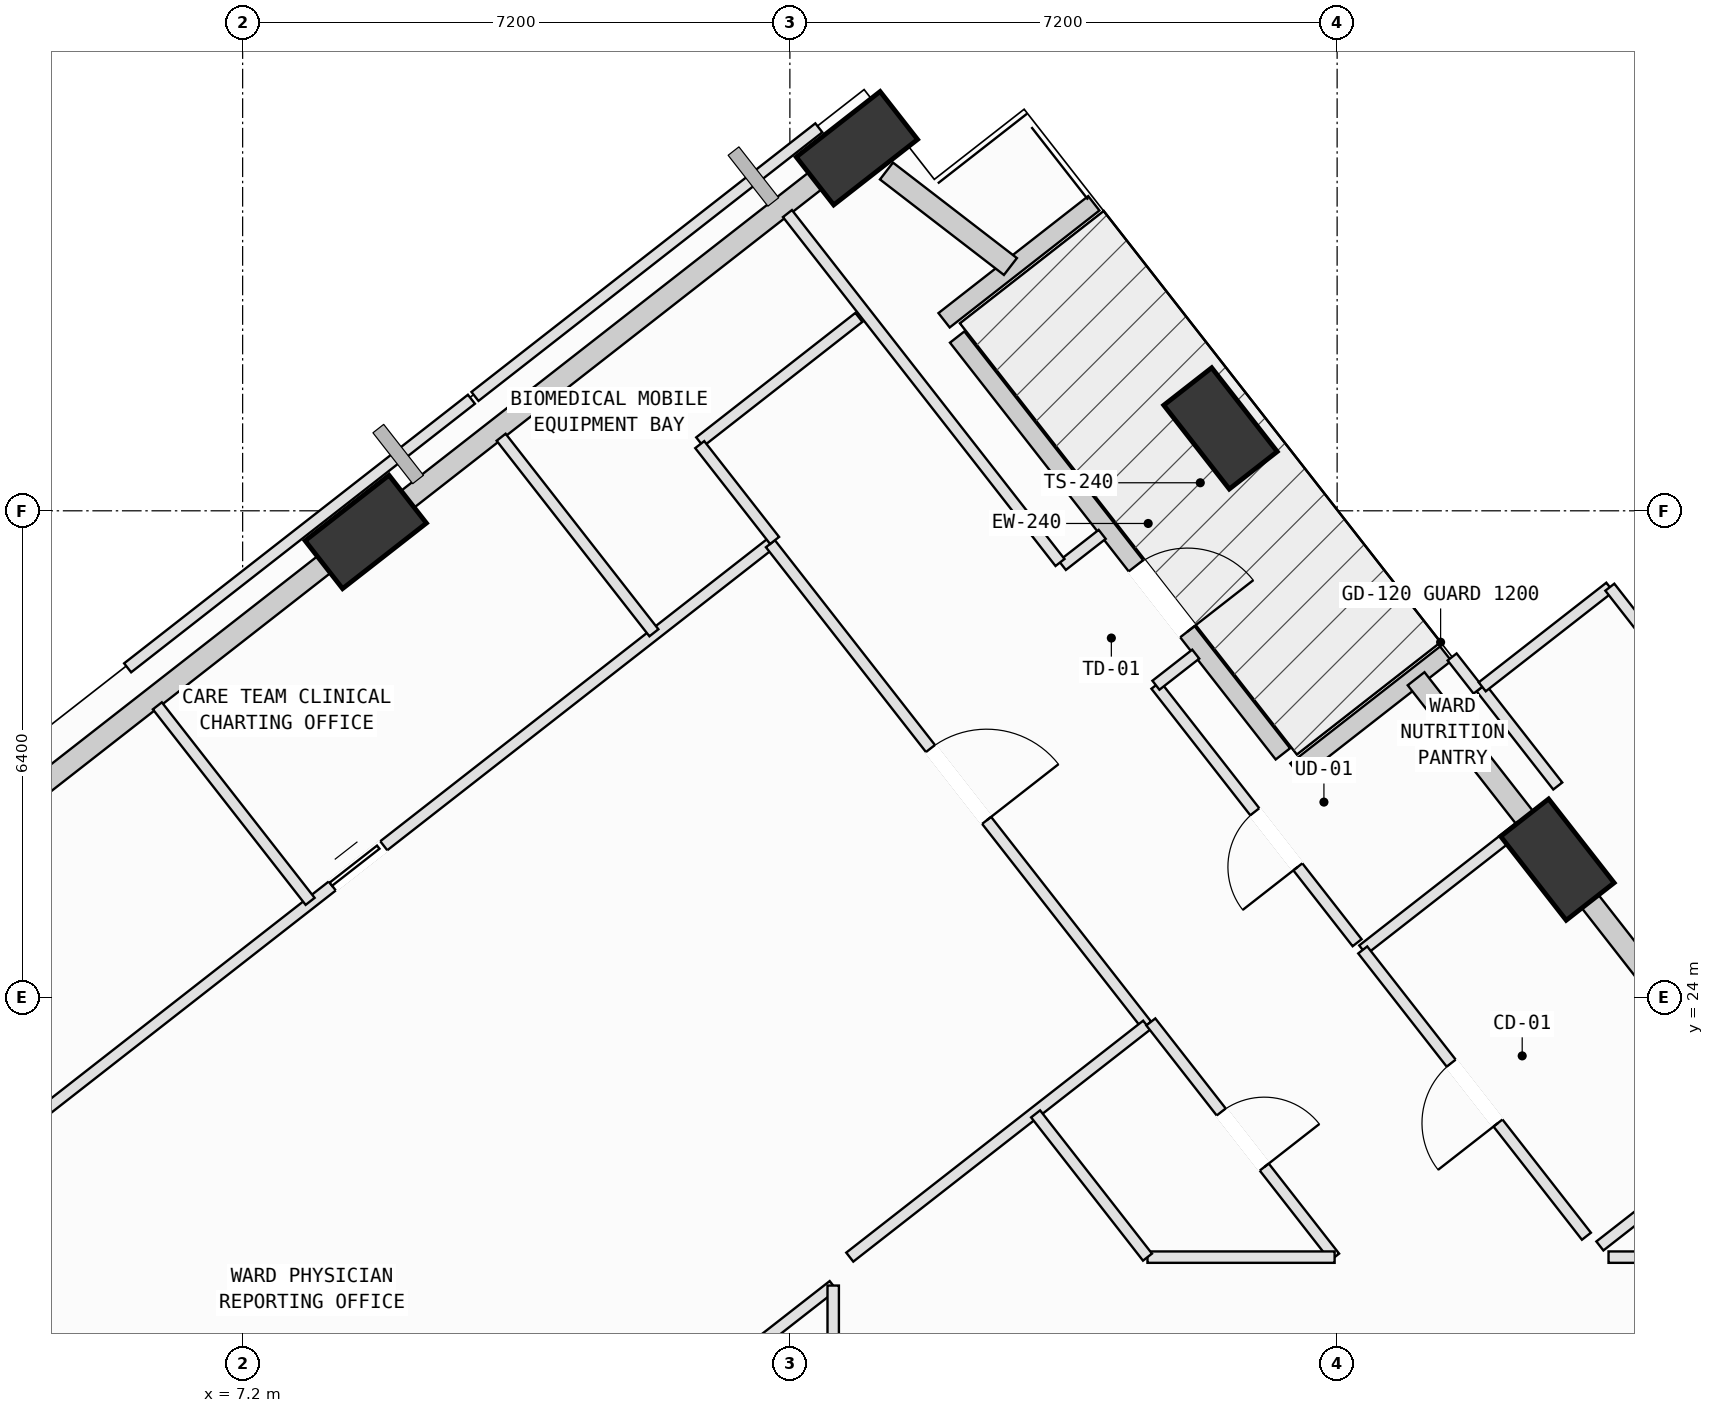
"""IFC4 building model, lengths in metres.
Left out: names, types, materials, properties, quantities, classifications, styles, units other than length and angle.
Written with IfcOpenShell. Run it as: python <this file> out.ifc"""

import sys

from ifc_helpers import new_model, si_unit, direction, frame, frame_2d, origin, origin_2d, place, context, subcontext, project, spatial, rectangle, extrude, element, fill, save


model = new_model("IFC4")
c1 = context("Model", 3, precision=1e-05, world=origin(), true_north=direction((0.0, 1.0)))
c2 = subcontext(c1, "Body", "Model", "MODEL_VIEW")
j1 = project(units=[si_unit("LENGTHUNIT", "METRE"), si_unit("PLANEANGLEUNIT", "RADIAN")], contexts=[c1])
p1 = place(None, origin())
s1 = spatial("IfcSite", under=j1, at=p1, CompositionType="ELEMENT")
p2 = place(p1, origin())
s2 = spatial("IfcBuilding", under=s1, at=p2, CompositionType="ELEMENT")
p3 = place(p2, frame((0.0, 0.0, 185.8)))
s3 = spatial("IfcBuildingStorey", under=s2, at=p3, CompositionType="ELEMENT", Elevation=185.8)
p4 = place(p3, frame((24.498, 25.811, 0.002), z_axis=(-0.003845969984, -0.037727134127, 0.99928067722), x_axis=(-0.532627653931, 0.845821943945, 0.029883463813)))
e1 = element("IfcColumn", 1, at=p4, inside=s3, PredefinedType="COLUMN", context=c2, shape_type="SweptSolid", body=[
    extrude(rectangle(XDim=1.4, YDim=0.8, at=origin_2d()), origin(), (0.0, 0.0, 1.0), 3.999),
])
p5 = place(p3, frame((20.065, 31.484, 0.002), z_axis=(-0.027193352358, -0.05627682562, 0.998044808857), x_axis=(-0.212163059009, 0.975992323481, 0.049252623267)))
e2 = element("IfcColumn", 2, at=p5, inside=s3, PredefinedType="COLUMN", context=c2, shape_type="SweptSolid", body=[
    extrude(rectangle(XDim=1.4, YDim=0.8, at=origin_2d()), origin(), (0.0, 0.0, 1.0), 4.004),
])
p6 = place(p3, frame((15.282, 35.171, 0.002), z_axis=(-0.0421758545, -0.07601391381, 0.996214375626), x_axis=(0.986621482124, 0.153992480505, 0.053519781005)))
e3 = element("IfcColumn", 3, at=p6, inside=s3, PredefinedType="COLUMN", context=c2, shape_type="SweptSolid", body=[
    extrude(rectangle(XDim=1.4, YDim=0.8, at=origin_2d()), origin(), (0.0, 0.0, 1.0), 4.011),
])
p7 = place(p3, frame((8.82, 30.122, 0.002), z_axis=(-0.021082622419, -0.102314513413, 0.994528663929), x_axis=(0.895367194922, 0.440659996949, 0.064314487843)))
e4 = element("IfcColumn", 4, at=p7, inside=s3, PredefinedType="COLUMN", context=c2, shape_type="SweptSolid", body=[
    extrude(rectangle(XDim=1.4, YDim=0.8, at=origin_2d()), origin(), (0.0, 0.0, 1.0), 4.018),
])
p8 = place(p3, frame((16.601, 32.686, 0.0), z_axis=(0.0, 0.0, 1.0), x_axis=(0.615648806913, -0.788020651091, 0.0)))
e5 = element("IfcWall", 5, at=p8, inside=s3, PredefinedType="SOLIDWALL", context=c2, shape_type="SweptSolid", body=[
    extrude(rectangle(XDim=6.96, YDim=0.24, at=frame_2d((3.48, 0.0))), origin(), (0.0, 0.0, 1.0), 3.265),
])
p9 = place(p8, frame((3.82, 0.0, 0.0)))
e6 = element("IfcOpeningElement", 6, at=p9, cuts=e5, PredefinedType="OPENING", context=c2, shape_type="SweptSolid", body=[
    extrude(rectangle(XDim=1.1, YDim=2.15, at=frame_2d((0.55, 1.075))), frame((0.0, 0.13, 0.0), z_axis=(0.0, -1.0, 0.0), x_axis=(1.0, 0.0, 0.0)), (0.0, 0.0, 1.0), 0.26),
])
for number, where, z_axis, x_axis in (
    (7, (21.059, 26.981, 0.0), (0.0, 0.0, 1.0), (0.788, 0.616, 0.0)),
    (8, (18.399, 34.446, 0.0), (0.0, 0.0, 1.0), (-0.788, -0.616, 0.0)),
):
    element("IfcWall", number, at=place(p3, frame(where, z_axis=z_axis, x_axis=x_axis)), inside=s3, PredefinedType="SOLIDWALL", context=c2, shape_type="SweptSolid", body=[
        extrude(rectangle(XDim=2.5, YDim=0.24, at=frame_2d((1.25, 0.0))), origin(), (0.0, 0.0, 1.0), 3.265),
    ])
p10 = place(p3, frame((28.998, 20.052, 0.0), z_axis=(0.0, 0.0, 1.0), x_axis=(-0.615664366432, 0.788008494819, 0.0)))
e9 = element("IfcWall", 9, at=p10, inside=s3, PredefinedType="SOLIDWALL", context=c2, shape_type="SweptSolid", body=[
    extrude(rectangle(XDim=6.76, YDim=0.28, at=frame_2d((3.38, 0.0))), origin(), (0.0, 0.0, 1.0), 3.265),
])
p11 = place(p3, frame((24.228, 26.156, 0.0), z_axis=(0.0, 0.0, 1.0), x_axis=(-0.615726632645, 0.787959842791, 0.0)))
e10 = element("IfcWall", 10, at=p11, inside=s3, PredefinedType="SOLIDWALL", context=c2, shape_type="SweptSolid", body=[
    extrude(rectangle(XDim=2.581, YDim=0.28, at=frame_2d((1.291, 0.0))), origin(), (0.0, 0.0, 1.0), 3.245),
])
p12 = place(p3, frame((15.671, 34.871, 0.0), z_axis=(0.0, 0.0, 1.0), x_axis=(0.792134413679, -0.610346680719, 0.0)))
e11 = element("IfcWall", 11, at=p12, inside=s3, PredefinedType="SOLIDWALL", context=c2, shape_type="SweptSolid", body=[
    extrude(rectangle(XDim=2.059, YDim=0.28, at=frame_2d((1.029, 0.0))), origin(), (0.0, 0.0, 1.0), 3.245),
])
p13 = place(p3, frame((9.07, 30.317, 0.0), z_axis=(0.0, 0.0, 1.0), x_axis=(0.787988540175, 0.615689906165, 0.0)))
e12 = element("IfcWall", 12, at=p13, inside=s3, PredefinedType="SOLIDWALL", context=c2, shape_type="SweptSolid", body=[
    extrude(rectangle(XDim=7.231, YDim=0.28, at=frame_2d((3.615, 0.0))), origin(), (0.0, 0.0, 1.0), 3.265),
])
p14 = place(p3, frame((2.589, 25.254, 0.0), z_axis=(0.0, 0.0, 1.0), x_axis=(0.788021319008, 0.615647951989, 0.0)))
e13 = element("IfcWall", 13, at=p14, inside=s3, PredefinedType="SOLIDWALL", context=c2, shape_type="SweptSolid", body=[
    extrude(rectangle(XDim=7.27, YDim=0.28, at=frame_2d((3.635, 0.0))), origin(), (0.0, 0.0, 1.0), 3.265),
])
p15 = place(p3, frame((7.227, 14.157, 0.0), z_axis=(0.0, 0.0, 1.0), x_axis=(0.788028517416, 0.615638738011, 0.0)))
e14 = element("IfcWall", 14, at=p15, inside=s3, PredefinedType="PARTITIONING", context=c2, shape_type="SweptSolid", body=[
    extrude(rectangle(XDim=9.826, YDim=0.15, at=frame_2d((4.913, 0.0))), origin(), (0.0, 0.0, 1.0), 3.78),
])
p16 = place(p3, frame((14.97, 20.206, 0.0), z_axis=(0.0, 0.0, 1.0), x_axis=(0.0, -1.0, 0.0)))
e15 = element("IfcWall", 15, at=p16, inside=s3, PredefinedType="PARTITIONING", context=c2, shape_type="SweptSolid", body=[
    extrude(rectangle(XDim=1.976, YDim=0.15, at=frame_2d((0.988, 0.0))), origin(), (0.0, 0.0, 1.0), 3.78),
])
p17 = place(p16, frame((0.775, 0.0, 0.0)))
e16 = element("IfcOpeningElement", 16, at=p17, cuts=e15, PredefinedType="OPENING", context=c2, shape_type="SweptSolid", body=[
    extrude(rectangle(XDim=0.86, YDim=2.06, at=frame_2d((0.43, 1.03))), frame((0.0, 0.085, 0.0), z_axis=(0.0, -1.0, 0.0), x_axis=(1.0, 0.0, 0.0)), (0.0, 0.0, 1.0), 0.17),
])
p18 = place(p3, frame((2.671, 21.004, 0.0), z_axis=(0.0, 0.0, 1.0), x_axis=(0.788033017359, 0.615632977961, 0.0)))
e17 = element("IfcWall", 17, at=p18, inside=s3, PredefinedType="PARTITIONING", context=c2, shape_type="SweptSolid", body=[
    extrude(rectangle(XDim=14.559, YDim=0.15, at=frame_2d((7.28, 0.0))), origin(), (0.0, 0.0, 1.0), 3.78),
])
p19 = place(p18, frame((7.244, 0.0, 0.0)))
e18 = element("IfcOpeningElement", 18, at=p19, cuts=e17, PredefinedType="OPENING", context=c2, shape_type="SweptSolid", body=[
    extrude(rectangle(XDim=0.86, YDim=2.06, at=frame_2d((0.43, 1.03))), frame((0.0, 0.085, 0.0), z_axis=(0.0, -1.0, 0.0), x_axis=(1.0, 0.0, 0.0)), (0.0, 0.0, 1.0), 0.17),
])
p20 = place(p3, frame((14.144, 29.967, 0.0), z_axis=(0.0, 0.0, 1.0), x_axis=(0.615702970694, -0.787978332112, 0.0)))
e19 = element("IfcWall", 19, at=p20, inside=s3, PredefinedType="PARTITIONING", context=c2, shape_type="SweptSolid", body=[
    extrude(rectangle(XDim=8.04, YDim=0.15, at=frame_2d((4.02, 0.0))), origin(), (0.0, 0.0, 1.0), 3.78),
])
p21 = place(p20, frame((3.42, 0.0, 0.0)))
e20 = element("IfcOpeningElement", 20, at=p21, cuts=e19, PredefinedType="OPENING", context=c2, shape_type="SweptSolid", body=[
    extrude(rectangle(XDim=1.2, YDim=2.15, at=frame_2d((0.6, 1.075))), frame((0.0, 0.085, 0.0), z_axis=(0.0, -1.0, 0.0), x_axis=(1.0, 0.0, 0.0)), (0.0, 0.0, 1.0), 0.17),
])
p22 = place(p3, frame((19.094, 23.632, 0.0), z_axis=(0.0, 0.0, 1.0), x_axis=(-0.787981810279, -0.615698519301, 0.0)))
e21 = element("IfcWall", 21, at=p22, inside=s3, PredefinedType="PARTITIONING", context=c2, shape_type="SweptSolid", body=[
    extrude(rectangle(XDim=4.957, YDim=0.15, at=frame_2d((2.479, 0.0))), origin(), (0.0, 0.0, 1.0), 3.78),
])
p23 = place(p3, frame((28.44, 20.578, 0.0), z_axis=(0.0, 0.0, 1.0), x_axis=(-0.999999774112, 0.000672143239, 0.0)))
e22 = element("IfcWall", 22, at=p23, inside=s3, PredefinedType="PARTITIONING", context=c2, shape_type="SweptSolid", body=[
    extrude(rectangle(XDim=3.269, YDim=0.15, at=frame_2d((1.635, 0.0))), origin(), (0.0, 0.0, 1.0), 3.78),
])
p24 = place(p3, frame((25.057, 20.727, 0.0), z_axis=(0.0, 0.0, 1.0), x_axis=(0.788068936461, 0.615586997414, 0.0)))
e23 = element("IfcWall", 23, at=p24, inside=s3, PredefinedType="PARTITIONING", context=c2, shape_type="SweptSolid", body=[
    extrude(rectangle(XDim=2.575, YDim=0.15, at=frame_2d((1.287, 0.0))), origin(), (0.0, 0.0, 1.0), 3.78),
])
p25 = place(p3, frame((21.937, 24.622, 0.0), z_axis=(0.0, 0.0, 1.0), x_axis=(0.788163411112, 0.615466032681, 0.0)))
e24 = element("IfcWall", 24, at=p25, inside=s3, PredefinedType="PARTITIONING", context=c2, shape_type="SweptSolid", body=[
    extrude(rectangle(XDim=2.635, YDim=0.15, at=frame_2d((1.317, 0.0))), origin(), (0.0, 0.0, 1.0), 3.78),
])
p26 = place(p3, frame((24.88, 20.855, 0.0), z_axis=(0.0, 0.0, 1.0), x_axis=(-0.61562223779, 0.788041407756, 0.0)))
e25 = element("IfcWall", 25, at=p26, inside=s3, PredefinedType="PARTITIONING", context=c2, shape_type="SweptSolid", body=[
    extrude(rectangle(XDim=4.78, YDim=0.15, at=frame_2d((2.39, 0.0))), origin(), (0.0, 0.0, 1.0), 3.415),
])
p27 = place(p26, frame((1.89, 0.0, 0.0)))
e26 = element("IfcOpeningElement", 26, at=p27, cuts=e25, PredefinedType="OPENING", context=c2, shape_type="SweptSolid", body=[
    extrude(rectangle(XDim=1.0, YDim=2.12, at=frame_2d((0.5, 1.06))), frame((0.0, 0.085, 0.0), z_axis=(0.0, -1.0, 0.0), x_axis=(1.0, 0.0, 0.0)), (0.0, 0.0, 1.0), 0.17),
])
p28 = place(p3, frame((23.494, 28.071, 0.0), z_axis=(0.0, 0.0, 1.0), x_axis=(0.615516872189, -0.788123708596, 0.0)))
e27 = element("IfcWall", 27, at=p28, inside=s3, PredefinedType="PARTITIONING", context=c2, shape_type="SweptSolid", body=[
    extrude(rectangle(XDim=1.639, YDim=0.15, at=frame_2d((0.82, 0.0))), origin(), (0.0, 0.0, 1.0), 3.78),
])
p29 = place(p3, frame((21.863, 24.717, 0.0), z_axis=(0.0, 0.0, 1.0), x_axis=(-0.615664978925, 0.788008016283, 0.0)))
e28 = element("IfcWall", 28, at=p29, inside=s3, PredefinedType="PARTITIONING", context=c2, shape_type="SweptSolid", body=[
    extrude(rectangle(XDim=4.299, YDim=0.15, at=frame_2d((2.15, 0.0))), origin(), (0.0, 0.0, 1.0), 3.78),
])
p30 = place(p29, frame((1.267, 0.0, 0.0)))
e29 = element("IfcOpeningElement", 29, at=p30, cuts=e28, PredefinedType="OPENING", context=c2, shape_type="SweptSolid", body=[
    extrude(rectangle(XDim=0.92, YDim=2.1, at=frame_2d((0.46, 1.05))), frame((0.0, 0.085, 0.0), z_axis=(0.0, -1.0, 0.0), x_axis=(1.0, 0.0, 0.0)), (0.0, 0.0, 1.0), 0.17),
])
p31 = place(p3, frame((19.216, 28.105, 0.0), z_axis=(0.0, 0.0, 1.0), x_axis=(0.78830274662, 0.615287558522, 0.0)))
e30 = element("IfcWall", 30, at=p31, inside=s3, PredefinedType="PARTITIONING", context=c2, shape_type="SweptSolid", body=[
    extrude(rectangle(XDim=0.665, YDim=0.15, at=frame_2d((0.332, 0.0))), origin(), (0.0, 0.0, 1.0), 3.78),
])
p32 = place(p3, frame((23.113, 28.477, 0.0), z_axis=(0.0, 0.0, 1.0), x_axis=(0.616106085267, -0.78766318417, 0.0)))
e31 = element("IfcWall", 31, at=p32, inside=s3, PredefinedType="PARTITIONING", context=c2, shape_type="SweptSolid", body=[
    extrude(rectangle(XDim=0.553, YDim=0.15, at=frame_2d((0.277, 0.0))), origin(), (0.0, 0.0, 1.0), 3.78),
])
p33 = place(p3, frame((18.509, 30.09, 0.0), z_axis=(0.0, 0.0, 1.0), x_axis=(-0.788124583887, -0.615515751442, 0.0)))
e32 = element("IfcWall", 32, at=p33, inside=s3, PredefinedType="PARTITIONING", context=c2, shape_type="SweptSolid", body=[
    extrude(rectangle(XDim=0.665, YDim=0.15, at=frame_2d((0.333, 0.0))), origin(), (0.0, 0.0, 1.0), 3.78),
])
p34 = place(p3, frame((17.954, 29.72, 0.0), z_axis=(0.0, 0.0, 1.0), x_axis=(-0.615581419992, 0.78807329314, 0.0)))
e33 = element("IfcWall", 33, at=p34, inside=s3, PredefinedType="PARTITIONING", context=c2, shape_type="SweptSolid", body=[
    extrude(rectangle(XDim=5.826, YDim=0.15, at=frame_2d((2.913, 0.0))), origin(), (0.0, 0.0, 1.0), 3.78),
])
p35 = place(p3, frame((14.651, 34.919, 0.0), z_axis=(0.0, 0.0, 1.0), x_axis=(0.787972015739, 0.61571105432, 0.0)))
e34 = element("IfcWall", 34, at=p35, inside=s3, PredefinedType="PARTITIONING", context=c2, shape_type="SweptSolid", body=[
    extrude(rectangle(XDim=1.202, YDim=0.15, at=frame_2d((0.601, 0.0))), origin(), (0.0, 0.0, 1.0), 3.265),
])
p36 = place(p3, frame((8.088, 25.261, 0.0), z_axis=(0.0, 0.0, 1.0), x_axis=(-0.615616471705, 0.788045912219, 0.0)))
e35 = element("IfcWall", 35, at=p36, inside=s3, PredefinedType="PARTITIONING", context=c2, shape_type="SweptSolid", body=[
    extrude(rectangle(XDim=3.265, YDim=0.15, at=frame_2d((1.633, 0.0))), origin(), (0.0, 0.0, 1.0), 3.78),
])
p37 = place(p3, frame((5.687, 28.334, 0.0), z_axis=(0.0, 0.0, 1.0), x_axis=(0.787992130079, 0.615685311611, 0.0)))
e36 = element("IfcWall", 36, at=p37, inside=s3, PredefinedType="PARTITIONING", context=c2, shape_type="SweptSolid", body=[
    extrude(rectangle(XDim=5.74, YDim=0.15, at=frame_2d((2.87, 0.0))), origin(), (0.0, 0.0, 1.0), 3.78),
])
p38 = place(p3, frame((10.601, 31.368, 0.0), z_axis=(0.0, 0.0, 1.0), x_axis=(0.615616471705, -0.788045912219, 0.0)))
e37 = element("IfcWall", 37, at=p38, inside=s3, PredefinedType="PARTITIONING", context=c2, shape_type="SweptSolid", body=[
    extrude(rectangle(XDim=3.265, YDim=0.15, at=frame_2d((1.633, 0.0))), origin(), (0.0, 0.0, 1.0), 3.78),
])
p39 = place(p3, frame((15.308, 32.945, 0.0), z_axis=(0.0, 0.0, 1.0), x_axis=(-0.787613503668, -0.616169594219, 0.0)))
e38 = element("IfcWall", 38, at=p39, inside=s3, PredefinedType="PARTITIONING", context=c2, shape_type="SweptSolid", body=[
    extrude(rectangle(XDim=2.659, YDim=0.15, at=frame_2d((1.329, 0.0))), origin(), (0.0, 0.0, 1.0), 3.78),
])
p40 = place(p3, frame((13.214, 31.271, 0.0), z_axis=(0.0, 0.0, 1.0), x_axis=(0.615534477154, -0.788109958974, 0.0)))
e39 = element("IfcWall", 39, at=p40, inside=s3, PredefinedType="PARTITIONING", context=c2, shape_type="SweptSolid", body=[
    extrude(rectangle(XDim=1.6, YDim=0.15, at=frame_2d((0.8, 0.0))), origin(), (0.0, 0.0, 1.0), 3.78),
])
p41 = place(p3, frame((19.149, 23.675, 0.0), z_axis=(0.0, 0.0, 1.0), x_axis=(0.615647660829, -0.788021546479, 0.0)))
e40 = element("IfcWall", 40, at=p41, inside=s3, PredefinedType="PARTITIONING", context=c2, shape_type="SweptSolid", body=[
    extrude(rectangle(XDim=3.927, YDim=0.15, at=frame_2d((1.964, 0.0))), origin(), (0.0, 0.0, 1.0), 3.78),
])
p42 = place(p41, frame((1.504, 0.0, 0.0)))
e41 = element("IfcOpeningElement", 41, at=p42, cuts=e40, PredefinedType="OPENING", context=c2, shape_type="SweptSolid", body=[
    extrude(rectangle(XDim=0.92, YDim=2.1, at=frame_2d((0.46, 1.05))), frame((0.0, 0.085, 0.0), z_axis=(0.0, -1.0, 0.0), x_axis=(1.0, 0.0, 0.0)), (0.0, 0.0, 1.0), 0.17),
])
p43 = place(p3, frame((21.567, 20.58, 0.0), z_axis=(0.0, 0.0, 1.0), x_axis=(-1.0, 0.0, 0.0)))
e42 = element("IfcWall", 42, at=p43, inside=s3, PredefinedType="PARTITIONING", context=c2, shape_type="SweptSolid", body=[
    extrude(rectangle(XDim=2.462, YDim=0.15, at=frame_2d((1.231, 0.0))), origin(), (0.0, 0.0, 1.0), 3.78),
])
p44 = place(p3, frame((19.105, 20.58, 0.0), z_axis=(0.0, 0.0, 1.0), x_axis=(-0.615451869475, 0.788174470761, 0.0)))
e43 = element("IfcWall", 43, at=p44, inside=s3, PredefinedType="PARTITIONING", context=c2, shape_type="SweptSolid", body=[
    extrude(rectangle(XDim=2.392, YDim=0.15, at=frame_2d((1.196, 0.0))), origin(), (0.0, 0.0, 1.0), 3.78),
])
p45 = place(p3, frame((10.257, 31.905, 0.0), z_axis=(0.0, 0.0, 1.0), x_axis=(0.788056610886, 0.615602776178, 0.0)))
e44 = element("IfcWall", 44, at=p45, inside=s3, PredefinedType="PARTITIONING", context=c2, shape_type="SweptSolid", body=[
    extrude(rectangle(XDim=5.741, YDim=0.15, at=frame_2d((2.87, 0.0))), origin(), (0.0, 0.0, 1.0), 3.78),
])
p46 = place(p3, frame((23.509, 28.084, 0.0), z_axis=(0.0, 0.0, 1.0), x_axis=(0.788172044174, 0.615454977056, 0.0)))
e45 = element("IfcWall", 45, at=p46, inside=s3, PredefinedType="PARTITIONING", context=c2, shape_type="SweptSolid", body=[
    extrude(rectangle(XDim=2.13, YDim=0.15, at=frame_2d((1.065, 0.0))), origin(), (0.0, 0.0, 1.0), 3.78),
])
p47 = place(p3, frame((25.188, 29.395, 0.0), z_axis=(0.0, 0.0, 1.0), x_axis=(0.615629591414, -0.78803566301, 0.0)))
e46 = element("IfcWall", 46, at=p47, inside=s3, PredefinedType="PARTITIONING", context=c2, shape_type="SweptSolid", body=[
    extrude(rectangle(XDim=6.229, YDim=0.15, at=frame_2d((3.115, 0.0))), origin(), (0.0, 0.0, 1.0), 3.78),
])
p48 = place(p9, origin())
e47 = element("IfcDoor", 47, at=p48, inside=s3, OperationType="SINGLE_SWING_RIGHT", PredefinedType="DOOR", context=c2, shape_type="SweptSolid", body=[
    extrude(rectangle(XDim=1.1, YDim=2.15, at=frame_2d((0.55, 1.075))), frame((0.0, 0.025, 0.0), z_axis=(0.0, -1.0, 0.0), x_axis=(1.0, 0.0, 0.0)), (0.0, 0.0, 1.0), 0.05),
])
fill(e6, e47)
p49 = place(p21, origin())
e48 = element("IfcDoor", 48, at=p49, inside=s3, OperationType="SINGLE_SWING_RIGHT", PredefinedType="DOOR", context=c2, shape_type="SweptSolid", body=[
    extrude(rectangle(XDim=1.2, YDim=2.15, at=frame_2d((0.6, 1.075))), frame((0.0, 0.025, 0.0), z_axis=(0.0, -1.0, 0.0), x_axis=(1.0, 0.0, 0.0)), (0.0, 0.0, 1.0), 0.05),
])
fill(e20, e48)
p50 = place(p27, origin())
e49 = element("IfcDoor", 49, at=p50, inside=s3, OperationType="SINGLE_SWING_LEFT", PredefinedType="DOOR", context=c2, shape_type="SweptSolid", body=[
    extrude(rectangle(XDim=1.0, YDim=2.12, at=frame_2d((0.5, 1.06))), frame((0.0, 0.025, 0.0), z_axis=(0.0, -1.0, 0.0), x_axis=(1.0, 0.0, 0.0)), (0.0, 0.0, 1.0), 0.05),
])
fill(e26, e49)
p51 = place(p30, origin())
e50 = element("IfcDoor", 50, at=p51, inside=s3, OperationType="SINGLE_SWING_LEFT", PredefinedType="DOOR", context=c2, shape_type="SweptSolid", body=[
    extrude(rectangle(XDim=0.92, YDim=2.1, at=frame_2d((0.46, 1.05))), frame((0.0, 0.025, 0.0), z_axis=(0.0, -1.0, 0.0), x_axis=(1.0, 0.0, 0.0)), (0.0, 0.0, 1.0), 0.05),
])
fill(e29, e50)
p52 = place(p42, origin())
e51 = element("IfcDoor", 51, at=p52, inside=s3, OperationType="SINGLE_SWING_RIGHT", PredefinedType="DOOR", context=c2, shape_type="SweptSolid", body=[
    extrude(rectangle(XDim=0.92, YDim=2.1, at=frame_2d((0.46, 1.05))), frame((0.0, 0.025, 0.0), z_axis=(0.0, -1.0, 0.0), x_axis=(1.0, 0.0, 0.0)), (0.0, 0.0, 1.0), 0.05),
])
fill(e41, e51)
p53 = place(p19, origin())
e52 = element("IfcDoor", 52, at=p53, inside=s3, OperationType="SLIDING_TO_LEFT", PredefinedType="DOOR", context=c2, shape_type="SweptSolid", body=[
    extrude(rectangle(XDim=0.86, YDim=2.06, at=frame_2d((0.43, 1.03))), frame((0.0, 0.025, 0.0), z_axis=(0.0, -1.0, 0.0), x_axis=(1.0, 0.0, 0.0)), (0.0, 0.0, 1.0), 0.05),
])
fill(e18, e52)
save(model, sys.argv[1])
